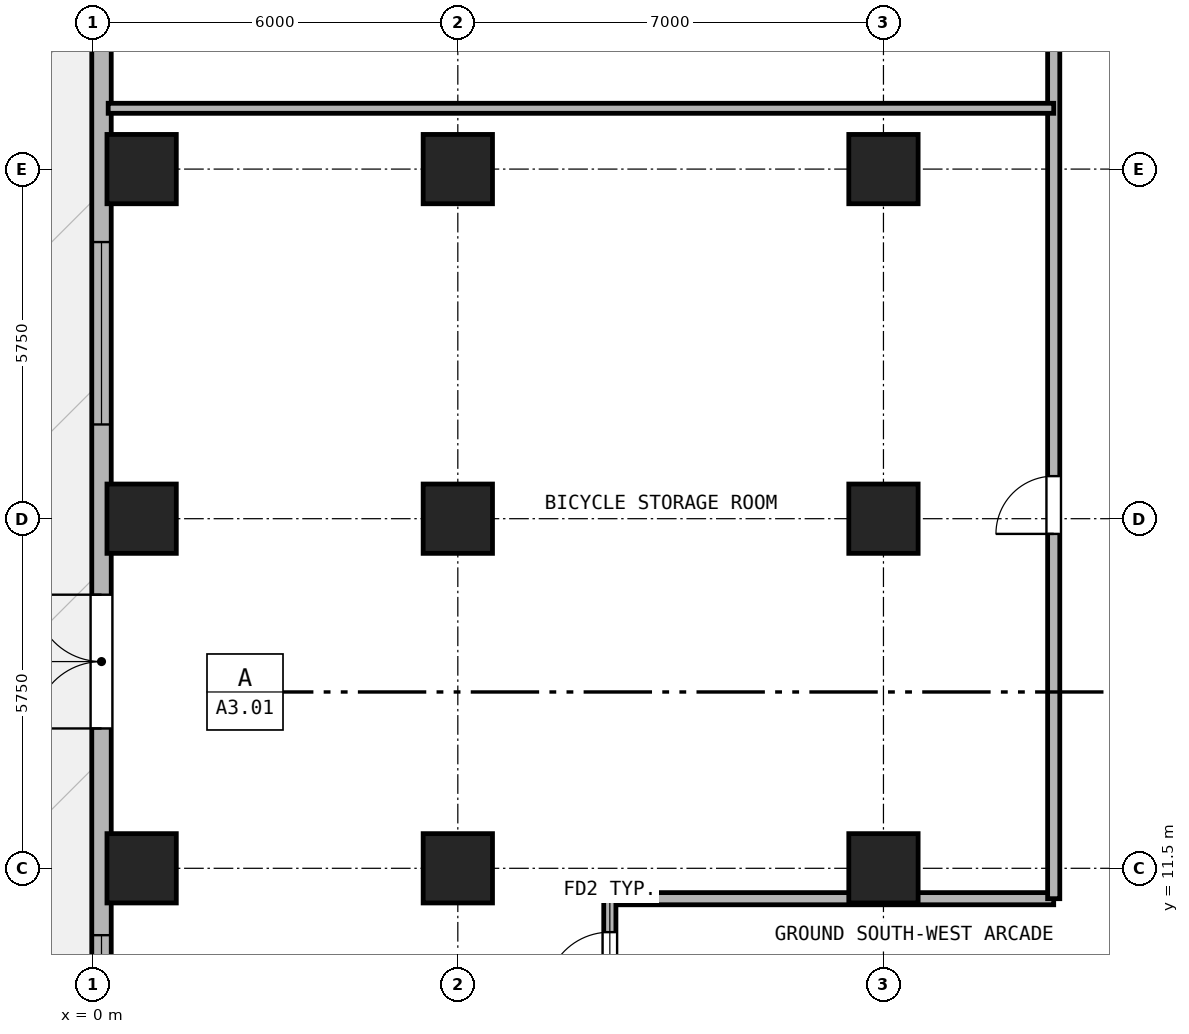
"""IFC4 building model, lengths in metres.
Left out: names, types, materials, properties, quantities, classifications, styles, units other than length and angle.
Written with IfcOpenShell. Run it as: python <this file> out.ifc"""

import sys

from ifc_helpers import new_model, si_unit, direction, frame, frame_2d, origin, origin_2d, place, context, subcontext, project, spatial, rectangle, hollow_rectangle, extrude, source, transform, mapped, element, fill, save


model = new_model("IFC4")
c1 = context("Model", 3, precision=1e-05, world=origin(), true_north=direction((0.0, 1.0)))
c2 = subcontext(c1, "Body", "Model", "MODEL_VIEW")
j1 = project(units=[si_unit("LENGTHUNIT", "METRE"), si_unit("PLANEANGLEUNIT", "RADIAN")], contexts=[c1])
p1 = place(None, origin())
s1 = spatial("IfcSite", under=j1, at=p1, CompositionType="ELEMENT")
p2 = place(p1, origin())
s2 = spatial("IfcBuilding", under=s1, at=p2, CompositionType="ELEMENT")
p3 = place(p2, origin())
s3 = spatial("IfcBuildingStorey", under=s2, at=p3, CompositionType="ELEMENT", Elevation=0.0)
m1 = source(origin(), c2, "Body", "SweptSolid", [
    extrude(hollow_rectangle(XDim=1.14, YDim=1.14, WallThickness=0.07, at=origin_2d()), origin(), (0.0, 0.0, 1.0), 4.18),
])
for number, where, z_axis, x_axis in (
    (1, (0.8, 11.5, 0.0), (0.0, 0.0, 1.0), (1.0, 0.0, 0.0)),
    (2, (0.8, 17.25, 0.0), (0.0, 0.0, 1.0), (1.0, 0.0, 0.0)),
    (3, (0.8, 23.0, 0.0), (0.0, 0.0, 1.0), (1.0, 0.0, 0.0)),
    (4, (6.0, 11.5, 0.0), (0.0, 0.0, 1.0), (1.0, 0.0, 0.0)),
    (5, (6.0, 17.25, 0.0), (0.0, 0.0, 1.0), (1.0, 0.0, 0.0)),
    (6, (6.0, 23.0, 0.0), (0.0, 0.0, 1.0), (1.0, 0.0, 0.0)),
    (7, (13.0, 11.5, 0.0), (0.0, 0.0, 1.0), (1.0, 0.0, 0.0)),
    (8, (13.0, 17.25, 0.0), (0.0, 0.0, 1.0), (1.0, 0.0, 0.0)),
    (9, (13.0, 23.0, 0.0), (0.0, 0.0, 1.0), (1.0, 0.0, 0.0)),
):
    element("IfcColumn", number, at=place(p3, frame(where, z_axis=z_axis, x_axis=x_axis)), inside=s3, PredefinedType="COLUMN", context=c2, shape_type="MappedRepresentation", body=[
        mapped(m1, transform((0.0, 0.0, 0.0), x_axis=(1.0, 0.0, 0.0), y_axis=(0.0, 1.0, 0.0), z_axis=(0.0, 0.0, 1.0), scale=1.0)),
    ])
p4 = place(p3, frame((0.14, 4.0, 0.0), z_axis=(0.0, 0.0, 1.0), x_axis=(0.0, 1.0, 0.0)))
e10 = element("IfcWall", 10, at=p4, inside=s3, PredefinedType="SOLIDWALL", context=c2, shape_type="SweptSolid", body=[
    extrude(rectangle(XDim=32.5, YDim=0.32, at=frame_2d((16.25, 0.0))), origin(), (0.0, 0.0, 1.0), 4.18),
])
p5 = place(p4, frame((9.8, 0.0, 0.0)))
e11 = element("IfcOpeningElement", 11, at=p5, cuts=e10, PredefinedType="OPENING", context=c2, shape_type="SweptSolid", body=[
    extrude(rectangle(XDim=2.2, YDim=2.5, at=frame_2d((1.1, 1.25))), frame((0.0, 0.17, 0.0), z_axis=(0.0, -1.0, 0.0), x_axis=(1.0, 0.0, 0.0)), (0.0, 0.0, 1.0), 0.34),
])
p6 = place(p4, frame((3.4, 0.0, 0.9)))
e12 = element("IfcOpeningElement", 12, at=p6, cuts=e10, PredefinedType="OPENING", context=c2, shape_type="SweptSolid", body=[
    extrude(rectangle(XDim=3.0, YDim=2.25, at=frame_2d((1.5, 1.125))), frame((0.0, 0.17, 0.0), z_axis=(0.0, -1.0, 0.0), x_axis=(1.0, 0.0, 0.0)), (0.0, 0.0, 1.0), 0.34),
])
p7 = place(p4, frame((14.8, 0.0, 0.9)))
e13 = element("IfcOpeningElement", 13, at=p7, cuts=e10, PredefinedType="OPENING", context=c2, shape_type="SweptSolid", body=[
    extrude(rectangle(XDim=3.0, YDim=2.25, at=frame_2d((1.5, 1.125))), frame((0.0, 0.17, 0.0), z_axis=(0.0, -1.0, 0.0), x_axis=(1.0, 0.0, 0.0)), (0.0, 0.0, 1.0), 0.34),
])
p8 = place(p4, frame((26.3, 0.0, 0.9)))
e14 = element("IfcOpeningElement", 14, at=p8, cuts=e10, PredefinedType="OPENING", context=c2, shape_type="SweptSolid", body=[
    extrude(rectangle(XDim=3.0, YDim=2.25, at=frame_2d((1.5, 1.125))), frame((0.0, 0.17, 0.0), z_axis=(0.0, -1.0, 0.0), x_axis=(1.0, 0.0, 0.0)), (0.0, 0.0, 1.0), 0.34),
])
p9 = place(p3, frame((8.5, 11.0, 0.0), z_axis=(0.0, 0.0, 1.0), x_axis=(1.0, 0.0, 0.0)))
e15 = element("IfcWall", 15, at=p9, inside=s3, PredefinedType="PARTITIONING", context=c2, shape_type="SweptSolid", body=[
    extrude(rectangle(XDim=7.3, YDim=0.2, at=frame_2d((3.65, 0.0))), origin(), (0.0, 0.0, 1.0), 4.18),
])
p10 = place(p3, frame((8.5, 8.9, 0.0), z_axis=(0.0, 0.0, 1.0), x_axis=(0.0, 1.0, 0.0)))
e16 = element("IfcWall", 16, at=p10, inside=s3, PredefinedType="PARTITIONING", context=c2, shape_type="SweptSolid", body=[
    extrude(rectangle(XDim=2.1, YDim=0.2, at=frame_2d((1.05, 0.0))), origin(), (0.0, 0.0, 1.0), 4.18),
])
p11 = place(p10, frame((0.5, 0.0, 0.0)))
e17 = element("IfcOpeningElement", 17, at=p11, cuts=e16, PredefinedType="OPENING", context=c2, shape_type="SweptSolid", body=[
    extrude(rectangle(XDim=1.05, YDim=2.15, at=frame_2d((0.525, 1.075))), frame((0.0, 0.11, 0.0), z_axis=(0.0, -1.0, 0.0), x_axis=(1.0, 0.0, 0.0)), (0.0, 0.0, 1.0), 0.22),
])
p12 = place(p3, frame((15.8, 11.0, 0.0), z_axis=(0.0, 0.0, 1.0), x_axis=(0.0, 1.0, 0.0)))
e18 = element("IfcWall", 18, at=p12, inside=s3, PredefinedType="PARTITIONING", context=c2, shape_type="SweptSolid", body=[
    extrude(rectangle(XDim=29.25, YDim=0.2, at=frame_2d((14.625, 0.0))), origin(), (0.0, 0.0, 1.0), 4.18),
])
p13 = place(p12, frame((6.0, 0.0, 0.0)))
e19 = element("IfcOpeningElement", 19, at=p13, cuts=e18, PredefinedType="OPENING", context=c2, shape_type="SweptSolid", body=[
    extrude(rectangle(XDim=0.95, YDim=2.15, at=frame_2d((0.475, 1.075))), frame((0.0, 0.11, 0.0), z_axis=(0.0, -1.0, 0.0), x_axis=(1.0, 0.0, 0.0)), (0.0, 0.0, 1.0), 0.22),
])
p14 = place(p12, frame((20.625, 0.0, 0.0)))
e20 = element("IfcOpeningElement", 20, at=p14, cuts=e18, PredefinedType="OPENING", context=c2, shape_type="SweptSolid", body=[
    extrude(rectangle(XDim=0.95, YDim=2.15, at=frame_2d((0.475, 1.075))), frame((0.0, 0.11, 0.0), z_axis=(0.0, -1.0, 0.0), x_axis=(1.0, 0.0, 0.0)), (0.0, 0.0, 1.0), 0.22),
])
p15 = place(p3, frame((0.25, 24.0, 0.0), z_axis=(0.0, 0.0, 1.0), x_axis=(1.0, 0.0, 0.0)))
e21 = element("IfcWall", 21, at=p15, inside=s3, PredefinedType="PARTITIONING", context=c2, shape_type="SweptSolid", body=[
    extrude(rectangle(XDim=15.55, YDim=0.165, at=frame_2d((7.775, 0.0))), origin(), (0.0, 0.0, 1.0), 4.18),
])
p16 = place(p5, origin())
e22 = element("IfcDoor", 22, at=p16, inside=s3, OperationType="DOUBLE_DOOR_SINGLE_SWING", PredefinedType="DOOR", context=c2, shape_type="SweptSolid", body=[
    extrude(rectangle(XDim=2.2, YDim=2.5, at=frame_2d((1.1, 1.25))), frame((0.0, 0.025, 0.0), z_axis=(0.0, -1.0, 0.0), x_axis=(1.0, 0.0, 0.0)), (0.0, 0.0, 1.0), 0.05),
])
fill(e11, e22)
p17 = place(p6, origin())
e23 = element("IfcWindow", 23, at=p17, inside=s3, PartitioningType="SINGLE_PANEL", PredefinedType="WINDOW", context=c2, shape_type="SweptSolid", body=[
    extrude(rectangle(XDim=3.0, YDim=2.25, at=frame_2d((1.5, 1.125))), frame((0.0, 0.03, 0.0), z_axis=(0.0, -1.0, 0.0), x_axis=(1.0, 0.0, 0.0)), (0.0, 0.0, 1.0), 0.06),
])
fill(e12, e23)
p18 = place(p7, origin())
e24 = element("IfcWindow", 24, at=p18, inside=s3, PartitioningType="SINGLE_PANEL", PredefinedType="WINDOW", context=c2, shape_type="SweptSolid", body=[
    extrude(rectangle(XDim=3.0, YDim=2.25, at=frame_2d((1.5, 1.125))), frame((0.0, 0.03, 0.0), z_axis=(0.0, -1.0, 0.0), x_axis=(1.0, 0.0, 0.0)), (0.0, 0.0, 1.0), 0.06),
])
fill(e13, e24)
p19 = place(p13, frame((0.95, 0.0, 0.0), z_axis=(0.0, 0.0, 1.0), x_axis=(-1.0, 0.0, 0.0)))
e25 = element("IfcDoor", 25, at=p19, inside=s3, OperationType="SINGLE_SWING_LEFT", PredefinedType="DOOR", context=c2, shape_type="SweptSolid", body=[
    extrude(rectangle(XDim=0.95, YDim=2.15, at=frame_2d((0.475, 1.075))), frame((0.0, 0.025, 0.0), z_axis=(0.0, -1.0, 0.0), x_axis=(1.0, 0.0, 0.0)), (0.0, 0.0, 1.0), 0.05),
])
fill(e19, e25)
p20 = place(p11, frame((1.05, 0.0, 0.0), z_axis=(0.0, 0.0, 1.0), x_axis=(-1.0, 0.0, 0.0)))
e26 = element("IfcDoor", 26, at=p20, inside=s3, OperationType="SINGLE_SWING_LEFT", PredefinedType="DOOR", context=c2, shape_type="SweptSolid", body=[
    extrude(rectangle(XDim=1.05, YDim=2.15, at=frame_2d((0.525, 1.075))), frame((0.0, 0.025, 0.0), z_axis=(0.0, -1.0, 0.0), x_axis=(1.0, 0.0, 0.0)), (0.0, 0.0, 1.0), 0.05),
])
fill(e17, e26)
save(model, sys.argv[1])
